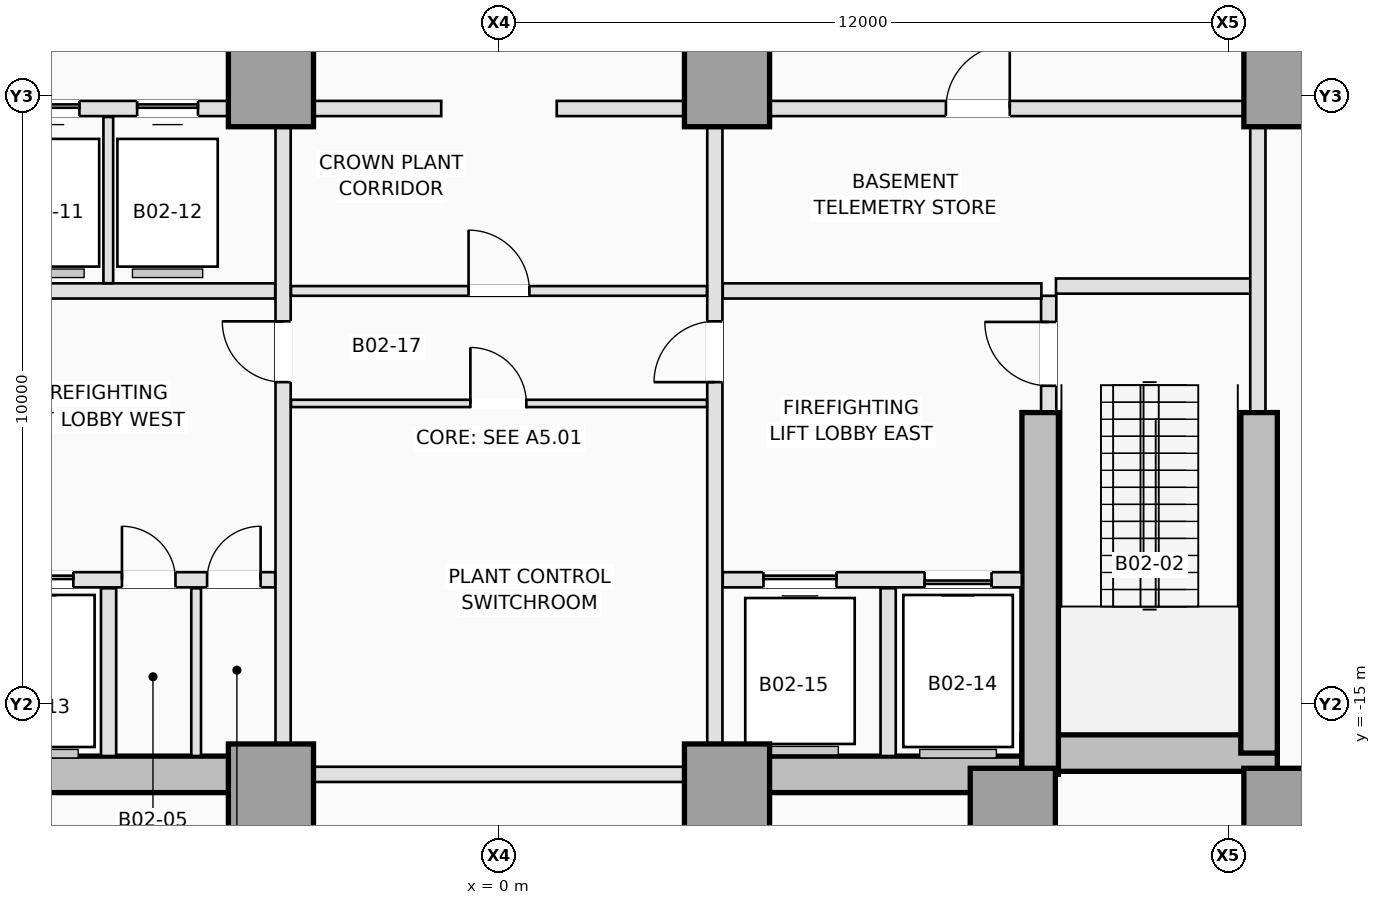
"""IFC4 building model, lengths in metres.
Left out: names, types, materials, properties, quantities, classifications, styles, units other than length and angle.
Written with IfcOpenShell. Run it as: python <this file> out.ifc"""

import sys

from ifc_helpers import new_model, si_unit, direction, frame, frame_2d, origin, origin_2d, place, context, subcontext, project, spatial, rectangle, extrude, element, fill, save


model = new_model("IFC4")
c1 = context("Model", 3, precision=1e-05, world=origin(), true_north=direction((0.0, 1.0)))
c2 = subcontext(c1, "Body", "Model", "MODEL_VIEW")
j1 = project(units=[si_unit("LENGTHUNIT", "METRE"), si_unit("PLANEANGLEUNIT", "RADIAN")], contexts=[c1])
p1 = place(None, origin())
s1 = spatial("IfcSite", under=j1, at=p1, CompositionType="ELEMENT")
p2 = place(p1, origin())
s2 = spatial("IfcBuilding", under=s1, at=p2, CompositionType="ELEMENT")
p3 = place(p2, frame((0.0, 0.0, -10.0)))
s3 = spatial("IfcBuildingStorey", under=s2, at=p3, CompositionType="ELEMENT", Elevation=-10.0)
for number, where, z_axis, x_axis in (
    (1, (-8.9, -16.15, 0.0), (0.0, 0.0, 1.0), (1.0, 0.0, 0.0)),
    (2, (3.75, -16.15, 0.0), (0.0, 0.0, 1.0), (1.0, 0.0, 0.0)),
):
    element("IfcWall", number, at=place(p3, frame(where, z_axis=z_axis, x_axis=x_axis)), inside=s3, PredefinedType="SHEAR", context=c2, shape_type="SweptSolid", body=[
        extrude(rectangle(XDim=5.15, YDim=0.6, at=frame_2d((2.575, 0.0))), origin(), (0.0, 0.0, 1.0), 5.0),
    ])
p4 = place(p3, frame((8.6, -15.8, 0.0), z_axis=(0.0, 0.0, 1.0), x_axis=(1.0, 0.0, 0.0)))
e3 = element("IfcWall", 3, at=p4, inside=s3, PredefinedType="SHEAR", context=c2, shape_type="SweptSolid", body=[
    extrude(rectangle(XDim=4.2, YDim=0.6, at=frame_2d((2.1, 0.0))), origin(), (0.0, 0.0, 1.0), 5.0),
])
p5 = place(p3, frame((12.5, -15.8, 0.0), z_axis=(0.0, 0.0, 1.0), x_axis=(0.0, 1.0, 0.0)))
e4 = element("IfcWall", 4, at=p5, inside=s3, PredefinedType="SHEAR", context=c2, shape_type="SweptSolid", body=[
    extrude(rectangle(XDim=5.6, YDim=0.6, at=frame_2d((2.8, 0.0))), origin(), (0.0, 0.0, 1.0), 5.0),
])
p6 = place(p3, frame((8.9, -16.15, 0.0), z_axis=(0.0, 0.0, 1.0), x_axis=(0.0, 1.0, 0.0)))
e5 = element("IfcWall", 5, at=p6, inside=s3, PredefinedType="SHEAR", context=c2, shape_type="SweptSolid", body=[
    extrude(rectangle(XDim=5.95, YDim=0.6, at=frame_2d((2.975, 0.0))), origin(), (0.0, 0.0, 1.0), 5.0),
])
for number, where, z_axis, x_axis in (
    (6, (-3.75, -16.35, -0.45), (0.0, 0.0, 1.0), (1.0, 0.0, 0.0)),
    (7, (3.75, -16.35, -0.45), (0.0, 0.0, 1.0), (1.0, 0.0, 0.0)),
    (8, (8.45, -16.75, -0.45), (0.0, 0.0, 1.0), (1.0, 0.0, 0.0)),
    (9, (12.95, -16.75, -0.45), (0.0, 0.0, 1.0), (1.0, 0.0, 0.0)),
    (10, (-3.75, -4.8, -0.45), (0.0, 0.0, 1.0), (1.0, 0.0, 0.0)),
    (11, (3.75, -4.8, -0.45), (0.0, 0.0, 1.0), (1.0, 0.0, 0.0)),
    (12, (12.95, -4.8, -0.45), (0.0, 0.0, 1.0), (1.0, 0.0, 0.0)),
):
    element("IfcColumn", number, at=place(p3, frame(where, z_axis=z_axis, x_axis=x_axis)), inside=s3, PredefinedType="COLUMN", context=c2, shape_type="SweptSolid", body=[
        extrude(rectangle(XDim=1.4, YDim=1.4, at=origin_2d()), origin(), (0.0, 0.0, 1.0), 5.45),
    ])
p7 = place(p3, frame((9.04, -10.18, 0.0), z_axis=(0.0, 0.0, 1.0), x_axis=(0.0, 1.0, 0.0)))
e13 = element("IfcWall", 13, at=p7, inside=s3, PredefinedType="PARTITIONING", context=c2, shape_type="SweptSolid", body=[
    extrude(rectangle(XDim=1.9, YDim=0.25, at=frame_2d((0.95, 0.0))), origin(), (0.0, 0.0, 1.0), 4.68),
])
p8 = place(p7, frame((0.42, 0.0, 0.0)))
e14 = element("IfcOpeningElement", 14, at=p8, cuts=e13, PredefinedType="OPENING", context=c2, shape_type="SweptSolid", body=[
    extrude(rectangle(XDim=1.05, YDim=2.15, at=frame_2d((0.525, 1.075))), frame((0.0, 0.135, 0.0), z_axis=(0.0, -1.0, 0.0), x_axis=(1.0, 0.0, 0.0)), (0.0, 0.0, 1.0), 0.27),
])
p9 = place(p3, frame((9.16, -8.12, 0.0), z_axis=(0.0, 0.0, 1.0), x_axis=(1.0, 0.0, 0.0)))
e15 = element("IfcWall", 15, at=p9, inside=s3, PredefinedType="PARTITIONING", context=c2, shape_type="SweptSolid", body=[
    extrude(rectangle(XDim=3.22, YDim=0.25, at=frame_2d((1.61, 0.0))), origin(), (0.0, 0.0, 1.0), 4.68),
])
p10 = place(p3, frame((12.48, -10.18, 0.0), z_axis=(0.0, 0.0, 1.0), x_axis=(0.0, 1.0, 0.0)))
e16 = element("IfcWall", 16, at=p10, inside=s3, PredefinedType="PARTITIONING", context=c2, shape_type="SweptSolid", body=[
    extrude(rectangle(XDim=4.678, YDim=0.25, at=frame_2d((2.339, 0.0))), origin(), (0.0, 0.0, 1.0), 4.68),
])
p11 = place(p3, frame((-8.598, -12.95, 0.0), z_axis=(0.0, 0.0, 1.0), x_axis=(1.0, 0.0, 0.0)))
e17 = element("IfcWall", 17, at=p11, inside=s3, PredefinedType="PARTITIONING", context=c2, shape_type="SweptSolid", body=[
    extrude(rectangle(XDim=4.918, YDim=0.25, at=frame_2d((2.459, 0.0))), origin(), (0.0, 0.0, 1.0), 4.68),
])
p12 = place(p11, frame((0.498, 0.0, 0.0)))
e18 = element("IfcOpeningElement", 18, at=p12, cuts=e17, PredefinedType="OPENING", context=c2, shape_type="SweptSolid", body=[
    extrude(rectangle(XDim=1.1, YDim=2.15, at=frame_2d((0.55, 1.075))), frame((0.0, 0.135, 0.0), z_axis=(0.0, -1.0, 0.0), x_axis=(1.0, 0.0, 0.0)), (0.0, 0.0, 1.0), 0.27),
])
p13 = place(p11, frame((2.398, 0.0, 0.0)))
e19 = element("IfcOpeningElement", 19, at=p13, cuts=e17, PredefinedType="OPENING", context=c2, shape_type="SweptSolid", body=[
    extrude(rectangle(XDim=0.88, YDim=2.1, at=frame_2d((0.44, 1.05))), frame((0.0, 0.135, 0.0), z_axis=(0.0, -1.0, 0.0), x_axis=(1.0, 0.0, 0.0)), (0.0, 0.0, 1.0), 0.27),
])
p14 = place(p11, frame((3.798, 0.0, 0.0)))
e20 = element("IfcOpeningElement", 20, at=p14, cuts=e17, PredefinedType="OPENING", context=c2, shape_type="SweptSolid", body=[
    extrude(rectangle(XDim=0.88, YDim=2.1, at=frame_2d((0.44, 1.05))), frame((0.0, 0.135, 0.0), z_axis=(0.0, -1.0, 0.0), x_axis=(1.0, 0.0, 0.0)), (0.0, 0.0, 1.0), 0.27),
])
p15 = place(p3, frame((3.68, -12.95, 0.0), z_axis=(0.0, 0.0, 1.0), x_axis=(1.0, 0.0, 0.0)))
e21 = element("IfcWall", 21, at=p15, inside=s3, PredefinedType="PARTITIONING", context=c2, shape_type="SweptSolid", body=[
    extrude(rectangle(XDim=4.918, YDim=0.25, at=frame_2d((2.459, 0.0))), origin(), (0.0, 0.0, 1.0), 4.68),
])
p16 = place(p15, frame((3.32, 0.0, 0.0)))
e22 = element("IfcOpeningElement", 22, at=p16, cuts=e21, PredefinedType="OPENING", context=c2, shape_type="SweptSolid", body=[
    extrude(rectangle(XDim=1.1, YDim=2.15, at=frame_2d((0.55, 1.075))), frame((0.0, 0.135, 0.0), z_axis=(0.0, -1.0, 0.0), x_axis=(1.0, 0.0, 0.0)), (0.0, 0.0, 1.0), 0.27),
])
p17 = place(p15, frame((0.67, 0.0, 0.0)))
e23 = element("IfcOpeningElement", 23, at=p17, cuts=e21, PredefinedType="OPENING", context=c2, shape_type="SweptSolid", body=[
    extrude(rectangle(XDim=1.2, YDim=2.15, at=frame_2d((0.6, 1.075))), frame((0.0, 0.135, 0.0), z_axis=(0.0, -1.0, 0.0), x_axis=(1.0, 0.0, 0.0)), (0.0, 0.0, 1.0), 0.27),
])
p18 = place(p3, frame((-6.42, -15.848, 0.0), z_axis=(0.0, 0.0, 1.0), x_axis=(0.0, 1.0, 0.0)))
e24 = element("IfcWall", 24, at=p18, inside=s3, PredefinedType="PARTITIONING", context=c2, shape_type="SweptSolid", body=[
    extrude(rectangle(XDim=2.758, YDim=0.25, at=frame_2d((1.379, 0.0))), origin(), (0.0, 0.0, 1.0), 4.68),
])
p19 = place(p3, frame((-4.98, -15.848, 0.0), z_axis=(0.0, 0.0, 1.0), x_axis=(0.0, 1.0, 0.0)))
e25 = element("IfcWall", 25, at=p19, inside=s3, PredefinedType="PARTITIONING", context=c2, shape_type="SweptSolid", body=[
    extrude(rectangle(XDim=2.758, YDim=0.16, at=frame_2d((1.379, 0.0))), origin(), (0.0, 0.0, 1.0), 4.68),
])
p20 = place(p3, frame((6.4, -15.848, 0.0), z_axis=(0.0, 0.0, 1.0), x_axis=(0.0, 1.0, 0.0)))
e26 = element("IfcWall", 26, at=p20, inside=s3, PredefinedType="PARTITIONING", context=c2, shape_type="SweptSolid", body=[
    extrude(rectangle(XDim=2.758, YDim=0.25, at=frame_2d((1.379, 0.0))), origin(), (0.0, 0.0, 1.0), 4.68),
])
for number, where, z_axis, x_axis in (
    (27, (-8.92, -8.2, 0.0), (0.0, 0.0, 1.0), (1.0, 0.0, 0.0)),
    (28, (3.68, -8.2, 0.0), (0.0, 0.0, 1.0), (1.0, 0.0, 0.0)),
):
    element("IfcWall", number, at=place(p3, frame(where, z_axis=z_axis, x_axis=x_axis)), inside=s3, PredefinedType="PARTITIONING", context=c2, shape_type="SweptSolid", body=[
        extrude(rectangle(XDim=5.24, YDim=0.25, at=frame_2d((2.62, 0.0))), origin(), (0.0, 0.0, 1.0), 4.68),
    ])
p21 = place(p3, frame((-3.55, -15.648, 0.0), z_axis=(0.0, 0.0, 1.0), x_axis=(0.0, 1.0, 0.0)))
e29 = element("IfcWall", 29, at=p21, inside=s3, PredefinedType="PARTITIONING", context=c2, shape_type="SweptSolid", body=[
    extrude(rectangle(XDim=10.146, YDim=0.25, at=frame_2d((5.073, 0.0))), origin(), (0.0, 0.0, 1.0), 4.68),
])
p22 = place(p21, frame((5.948, 0.0, 0.0)))
e30 = element("IfcOpeningElement", 30, at=p22, cuts=e29, PredefinedType="OPENING", context=c2, shape_type="SweptSolid", body=[
    extrude(rectangle(XDim=1.0, YDim=2.15, at=frame_2d((0.5, 1.075))), frame((0.0, 0.135, 0.0), z_axis=(0.0, -1.0, 0.0), x_axis=(1.0, 0.0, 0.0)), (0.0, 0.0, 1.0), 0.27),
])
p23 = place(p3, frame((3.55, -15.648, 0.0), z_axis=(0.0, 0.0, 1.0), x_axis=(0.0, 1.0, 0.0)))
e31 = element("IfcWall", 31, at=p23, inside=s3, PredefinedType="PARTITIONING", context=c2, shape_type="SweptSolid", body=[
    extrude(rectangle(XDim=10.146, YDim=0.25, at=frame_2d((5.073, 0.0))), origin(), (0.0, 0.0, 1.0), 4.68),
])
p24 = place(p23, frame((5.948, 0.0, 0.0)))
e32 = element("IfcOpeningElement", 32, at=p24, cuts=e31, PredefinedType="OPENING", context=c2, shape_type="SweptSolid", body=[
    extrude(rectangle(XDim=1.0, YDim=2.15, at=frame_2d((0.5, 1.075))), frame((0.0, 0.135, 0.0), z_axis=(0.0, -1.0, 0.0), x_axis=(1.0, 0.0, 0.0)), (0.0, 0.0, 1.0), 0.27),
])
p25 = place(p3, frame((-12.248, -5.2, 0.0), z_axis=(0.0, 0.0, 1.0), x_axis=(1.0, 0.0, 0.0)))
e33 = element("IfcWall", 33, at=p25, inside=s3, PredefinedType="PARTITIONING", context=c2, shape_type="SweptSolid", body=[
    extrude(rectangle(XDim=7.796, YDim=0.25, at=frame_2d((3.898, 0.0))), origin(), (0.0, 0.0, 1.0), 4.68),
])
p26 = place(p25, frame((0.448, 0.0, 0.0)))
e34 = element("IfcOpeningElement", 34, at=p26, cuts=e33, PredefinedType="OPENING", context=c2, shape_type="SweptSolid", body=[
    extrude(rectangle(XDim=1.0, YDim=2.15, at=frame_2d((0.5, 1.075))), frame((0.0, 0.135, 0.0), z_axis=(0.0, -1.0, 0.0), x_axis=(1.0, 0.0, 0.0)), (0.0, 0.0, 1.0), 0.27),
])
p27 = place(p25, frame((2.398, 0.0, 0.0)))
e35 = element("IfcOpeningElement", 35, at=p27, cuts=e33, PredefinedType="OPENING", context=c2, shape_type="SweptSolid", body=[
    extrude(rectangle(XDim=1.0, YDim=2.15, at=frame_2d((0.5, 1.075))), frame((0.0, 0.135, 0.0), z_axis=(0.0, -1.0, 0.0), x_axis=(1.0, 0.0, 0.0)), (0.0, 0.0, 1.0), 0.27),
])
p28 = place(p25, frame((4.348, 0.0, 0.0)))
e36 = element("IfcOpeningElement", 36, at=p28, cuts=e33, PredefinedType="OPENING", context=c2, shape_type="SweptSolid", body=[
    extrude(rectangle(XDim=1.0, YDim=2.15, at=frame_2d((0.5, 1.075))), frame((0.0, 0.135, 0.0), z_axis=(0.0, -1.0, 0.0), x_axis=(1.0, 0.0, 0.0)), (0.0, 0.0, 1.0), 0.27),
])
p29 = place(p25, frame((6.298, 0.0, 0.0)))
e37 = element("IfcOpeningElement", 37, at=p29, cuts=e33, PredefinedType="OPENING", context=c2, shape_type="SweptSolid", body=[
    extrude(rectangle(XDim=1.0, YDim=2.15, at=frame_2d((0.5, 1.075))), frame((0.0, 0.135, 0.0), z_axis=(0.0, -1.0, 0.0), x_axis=(1.0, 0.0, 0.0)), (0.0, 0.0, 1.0), 0.27),
])
p30 = place(p3, frame((4.452, -5.2, 0.0), z_axis=(0.0, 0.0, 1.0), x_axis=(1.0, 0.0, 0.0)))
e38 = element("IfcWall", 38, at=p30, inside=s3, PredefinedType="PARTITIONING", context=c2, shape_type="SweptSolid", body=[
    extrude(rectangle(XDim=7.796, YDim=0.25, at=frame_2d((3.898, 0.0))), origin(), (0.0, 0.0, 1.0), 4.68),
])
p31 = place(p30, frame((2.898, 0.0, 0.0)))
e39 = element("IfcOpeningElement", 39, at=p31, cuts=e38, PredefinedType="OPENING", context=c2, shape_type="SweptSolid", body=[
    extrude(rectangle(XDim=1.05, YDim=2.12, at=frame_2d((0.525, 1.06))), frame((0.0, 0.135, 0.0), z_axis=(0.0, -1.0, 0.0), x_axis=(1.0, 0.0, 0.0)), (0.0, 0.0, 1.0), 0.27),
])
for number, where, z_axis, x_axis in (
    (40, (-3.048, -5.2, 0.0), (0.0, 0.0, 1.0), (1.0, 0.0, 0.0)),
    (41, (0.95, -5.2, 0.0), (0.0, 0.0, 1.0), (1.0, 0.0, 0.0)),
):
    element("IfcWall", number, at=place(p3, frame(where, z_axis=z_axis, x_axis=x_axis)), inside=s3, PredefinedType="PARTITIONING", context=c2, shape_type="SweptSolid", body=[
        extrude(rectangle(XDim=2.098, YDim=0.25, at=frame_2d((1.049, 0.0))), origin(), (0.0, 0.0, 1.0), 4.68),
    ])
p32 = place(p3, frame((-6.425, -8.073, 0.0), z_axis=(0.0, 0.0, 1.0), x_axis=(0.0, 1.0, 0.0)))
e42 = element("IfcWall", 42, at=p32, inside=s3, PredefinedType="PARTITIONING", context=c2, shape_type="SweptSolid", body=[
    extrude(rectangle(XDim=2.733, YDim=0.16, at=frame_2d((1.366, 0.0))), origin(), (0.0, 0.0, 1.0), 4.68),
])
p33 = place(p3, frame((-3.048, -16.15, 0.0), z_axis=(0.0, 0.0, 1.0), x_axis=(1.0, 0.0, 0.0)))
e43 = element("IfcWall", 43, at=p33, inside=s3, PredefinedType="PARTITIONING", context=c2, shape_type="SweptSolid", body=[
    extrude(rectangle(XDim=6.096, YDim=0.25, at=frame_2d((3.048, 0.0))), origin(), (0.0, 0.0, 1.0), 3.656),
])
p34 = place(p3, frame((-3.42, -8.2, 0.0), z_axis=(0.0, 0.0, 1.0), x_axis=(1.0, 0.0, 0.0)))
e44 = element("IfcWall", 44, at=p34, inside=s3, PredefinedType="PARTITIONING", context=c2, shape_type="SweptSolid", body=[
    extrude(rectangle(XDim=6.84, YDim=0.16, at=frame_2d((3.42, 0.0))), origin(), (0.0, 0.0, 1.0), 4.68),
])
p35 = place(p34, frame((2.92, 0.0, 0.0)))
e45 = element("IfcOpeningElement", 45, at=p35, cuts=e44, PredefinedType="OPENING", context=c2, shape_type="SweptSolid", body=[
    extrude(rectangle(XDim=1.0, YDim=2.15, at=frame_2d((0.5, 1.075))), frame((0.0, 0.09, 0.0), z_axis=(0.0, -1.0, 0.0), x_axis=(1.0, 0.0, 0.0)), (0.0, 0.0, 1.0), 0.18),
])
p36 = place(p3, frame((-3.42, -10.05, 0.0), z_axis=(0.0, 0.0, 1.0), x_axis=(1.0, 0.0, 0.0)))
e46 = element("IfcWall", 46, at=p36, inside=s3, PredefinedType="PARTITIONING", context=c2, shape_type="SweptSolid", body=[
    extrude(rectangle(XDim=6.84, YDim=0.12, at=frame_2d((3.42, 0.0))), origin(), (0.0, 0.0, 1.0), 4.68),
])
p37 = place(p36, frame((2.95, 0.0, 0.0)))
e47 = element("IfcOpeningElement", 47, at=p37, cuts=e46, PredefinedType="OPENING", context=c2, shape_type="SweptSolid", body=[
    extrude(rectangle(XDim=0.92, YDim=2.12, at=frame_2d((0.46, 1.06))), frame((0.0, 0.07, 0.0), z_axis=(0.0, -1.0, 0.0), x_axis=(1.0, 0.0, 0.0)), (0.0, 0.0, 1.0), 0.14),
])
p38 = place(p28, origin())
e48 = element("IfcDoor", 48, at=p38, inside=s3, OperationType="SLIDING_TO_LEFT", PredefinedType="DOOR", context=c2, shape_type="SweptSolid", body=[
    extrude(rectangle(XDim=1.0, YDim=2.15, at=frame_2d((0.5, 1.075))), frame((0.0, 0.025, 0.0), z_axis=(0.0, -1.0, 0.0), x_axis=(1.0, 0.0, 0.0)), (0.0, 0.0, 1.0), 0.05),
])
fill(e36, e48)
p39 = place(p29, origin())
e49 = element("IfcDoor", 49, at=p39, inside=s3, OperationType="SLIDING_TO_LEFT", PredefinedType="DOOR", context=c2, shape_type="SweptSolid", body=[
    extrude(rectangle(XDim=1.0, YDim=2.15, at=frame_2d((0.5, 1.075))), frame((0.0, 0.025, 0.0), z_axis=(0.0, -1.0, 0.0), x_axis=(1.0, 0.0, 0.0)), (0.0, 0.0, 1.0), 0.05),
])
fill(e37, e49)
p40 = place(p12, origin())
e50 = element("IfcDoor", 50, at=p40, inside=s3, OperationType="SLIDING_TO_LEFT", PredefinedType="DOOR", context=c2, shape_type="SweptSolid", body=[
    extrude(rectangle(XDim=1.1, YDim=2.15, at=frame_2d((0.55, 1.075))), frame((0.0, 0.025, 0.0), z_axis=(0.0, -1.0, 0.0), x_axis=(1.0, 0.0, 0.0)), (0.0, 0.0, 1.0), 0.05),
])
fill(e18, e50)
p41 = place(p16, origin())
e51 = element("IfcDoor", 51, at=p41, inside=s3, OperationType="SLIDING_TO_RIGHT", PredefinedType="DOOR", context=c2, shape_type="SweptSolid", body=[
    extrude(rectangle(XDim=1.1, YDim=2.15, at=frame_2d((0.55, 1.075))), frame((0.0, 0.025, 0.0), z_axis=(0.0, -1.0, 0.0), x_axis=(1.0, 0.0, 0.0)), (0.0, 0.0, 1.0), 0.05),
])
fill(e22, e51)
p42 = place(p17, origin())
e52 = element("IfcDoor", 52, at=p42, inside=s3, OperationType="SLIDING_TO_LEFT", PredefinedType="DOOR", context=c2, shape_type="SweptSolid", body=[
    extrude(rectangle(XDim=1.2, YDim=2.15, at=frame_2d((0.6, 1.075))), frame((0.0, 0.025, 0.0), z_axis=(0.0, -1.0, 0.0), x_axis=(1.0, 0.0, 0.0)), (0.0, 0.0, 1.0), 0.05),
])
fill(e23, e52)
p43 = place(p8, origin())
e53 = element("IfcDoor", 53, at=p43, inside=s3, OperationType="SINGLE_SWING_RIGHT", PredefinedType="DOOR", context=c2, shape_type="SweptSolid", body=[
    extrude(rectangle(XDim=1.05, YDim=2.15, at=frame_2d((0.525, 1.075))), frame((0.0, 0.025, 0.0), z_axis=(0.0, -1.0, 0.0), x_axis=(1.0, 0.0, 0.0)), (0.0, 0.0, 1.0), 0.05),
])
fill(e14, e53)
p44 = place(p13, origin())
e54 = element("IfcDoor", 54, at=p44, inside=s3, OperationType="SINGLE_SWING_LEFT", PredefinedType="TRAPDOOR", context=c2, shape_type="SweptSolid", body=[
    extrude(rectangle(XDim=0.88, YDim=2.1, at=frame_2d((0.44, 1.05))), frame((0.0, 0.025, 0.0), z_axis=(0.0, -1.0, 0.0), x_axis=(1.0, 0.0, 0.0)), (0.0, 0.0, 1.0), 0.05),
])
fill(e19, e54)
p45 = place(p14, origin())
e55 = element("IfcDoor", 55, at=p45, inside=s3, OperationType="SINGLE_SWING_RIGHT", PredefinedType="TRAPDOOR", context=c2, shape_type="SweptSolid", body=[
    extrude(rectangle(XDim=0.88, YDim=2.1, at=frame_2d((0.44, 1.05))), frame((0.0, 0.025, 0.0), z_axis=(0.0, -1.0, 0.0), x_axis=(1.0, 0.0, 0.0)), (0.0, 0.0, 1.0), 0.05),
])
fill(e20, e55)
p46 = place(p22, origin())
e56 = element("IfcDoor", 56, at=p46, inside=s3, OperationType="SINGLE_SWING_RIGHT", PredefinedType="DOOR", context=c2, shape_type="SweptSolid", body=[
    extrude(rectangle(XDim=1.0, YDim=2.15, at=frame_2d((0.5, 1.075))), frame((0.0, 0.025, 0.0), z_axis=(0.0, -1.0, 0.0), x_axis=(1.0, 0.0, 0.0)), (0.0, 0.0, 1.0), 0.05),
])
fill(e30, e56)
p47 = place(p24, origin())
e57 = element("IfcDoor", 57, at=p47, inside=s3, OperationType="SINGLE_SWING_LEFT", PredefinedType="DOOR", context=c2, shape_type="SweptSolid", body=[
    extrude(rectangle(XDim=1.0, YDim=2.15, at=frame_2d((0.5, 1.075))), frame((0.0, 0.025, 0.0), z_axis=(0.0, -1.0, 0.0), x_axis=(1.0, 0.0, 0.0)), (0.0, 0.0, 1.0), 0.05),
])
fill(e32, e57)
p48 = place(p31, origin())
e58 = element("IfcDoor", 58, at=p48, inside=s3, OperationType="SINGLE_SWING_RIGHT", PredefinedType="DOOR", context=c2, shape_type="SweptSolid", body=[
    extrude(rectangle(XDim=1.05, YDim=2.12, at=frame_2d((0.525, 1.06))), frame((0.0, 0.025, 0.0), z_axis=(0.0, -1.0, 0.0), x_axis=(1.0, 0.0, 0.0)), (0.0, 0.0, 1.0), 0.05),
])
fill(e39, e58)
p49 = place(p35, origin())
e59 = element("IfcDoor", 59, at=p49, inside=s3, OperationType="SINGLE_SWING_LEFT", PredefinedType="DOOR", context=c2, shape_type="SweptSolid", body=[
    extrude(rectangle(XDim=1.0, YDim=2.15, at=frame_2d((0.5, 1.075))), frame((0.0, 0.025, 0.0), z_axis=(0.0, -1.0, 0.0), x_axis=(1.0, 0.0, 0.0)), (0.0, 0.0, 1.0), 0.05),
])
fill(e45, e59)
p50 = place(p37, origin())
e60 = element("IfcDoor", 60, at=p50, inside=s3, OperationType="SINGLE_SWING_LEFT", PredefinedType="DOOR", context=c2, shape_type="SweptSolid", body=[
    extrude(rectangle(XDim=0.92, YDim=2.12, at=frame_2d((0.46, 1.06))), frame((0.0, 0.025, 0.0), z_axis=(0.0, -1.0, 0.0), x_axis=(1.0, 0.0, 0.0)), (0.0, 0.0, 1.0), 0.05),
])
fill(e47, e60)
save(model, sys.argv[1])
